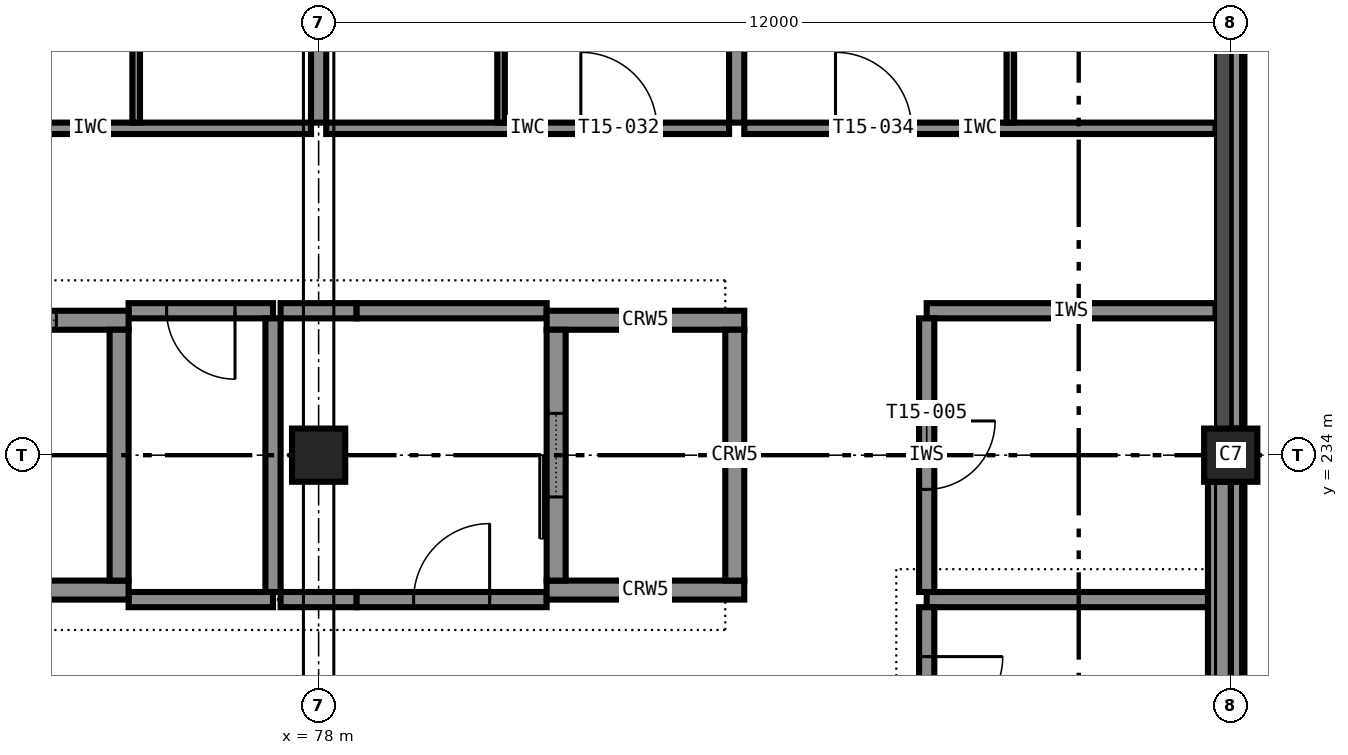
"""IFC4 building model, lengths in metres.
Left out: names, types, materials, properties, quantities, classifications, styles, units other than length and angle.
Written with IfcOpenShell. Run it as: python <this file> out.ifc"""

import sys

from ifc_helpers import new_model, si_unit, direction, frame, frame_2d, origin, origin_2d, place, context, subcontext, project, spatial, rectangle, extrude, element, fill, save


model = new_model("IFC4")
c1 = context("Model", 3, precision=1e-05, world=origin(), true_north=direction((0.0, 1.0)))
c2 = subcontext(c1, "Body", "Model", "MODEL_VIEW")
j1 = project(units=[si_unit("LENGTHUNIT", "METRE"), si_unit("PLANEANGLEUNIT", "RADIAN")], contexts=[c1])
p1 = place(None, origin())
s1 = spatial("IfcSite", under=j1, at=p1, CompositionType="ELEMENT")
p2 = place(p1, origin())
s2 = spatial("IfcBuilding", under=s1, at=p2, CompositionType="ELEMENT")
p3 = place(p2, frame((0.0, 0.0, 60.6)))
s3 = spatial("IfcBuildingStorey", under=s2, at=p3, CompositionType="ELEMENT", Elevation=60.6)
for number, where, z_axis, x_axis in (
    (1, (78.0, 234.0, 0.0), (0.0, 0.0, 1.0), (1.0, 0.0, 0.0)),
    (2, (90.0, 234.0, 0.0), (0.0, 0.0, 1.0), (1.0, 0.0, 0.0)),
):
    element("IfcColumn", number, at=place(p3, frame(where, z_axis=z_axis, x_axis=x_axis)), inside=s3, PredefinedType="COLUMN", context=c2, shape_type="SweptSolid", body=[
        extrude(rectangle(XDim=0.7, YDim=0.7, at=origin_2d()), origin(), (0.0, 0.0, 1.0), 3.6),
    ])
p4 = place(p3, frame((72.5, 232.225, 0.0), z_axis=(0.0, 0.0, 1.0), x_axis=(1.0, 0.0, 0.0)))
e3 = element("IfcWall", 3, at=p4, inside=s3, PredefinedType="SHEAR", context=c2, shape_type="SweptSolid", body=[
    extrude(rectangle(XDim=3.0, YDim=0.25, at=frame_2d((1.5, 0.0))), origin(), (0.0, 0.0, 1.0), 3.6),
])
p5 = place(p3, frame((72.5, 235.775, 0.0), z_axis=(0.0, 0.0, 1.0), x_axis=(1.0, 0.0, 0.0)))
e4 = element("IfcWall", 4, at=p5, inside=s3, PredefinedType="SHEAR", context=c2, shape_type="SweptSolid", body=[
    extrude(rectangle(XDim=3.0, YDim=0.25, at=frame_2d((1.5, 0.0))), origin(), (0.0, 0.0, 1.0), 3.6),
])
p6 = place(p5, frame((0.95, 0.0, 0.0)))
e5 = element("IfcOpeningElement", 5, at=p6, cuts=e4, PredefinedType="OPENING", context=c2, shape_type="SweptSolid", body=[
    extrude(rectangle(XDim=1.1, YDim=2.1, at=frame_2d((0.55, 1.05))), frame((0.0, 0.135, 0.0), z_axis=(0.0, -1.0, 0.0), x_axis=(1.0, 0.0, 0.0)), (0.0, 0.0, 1.0), 0.27),
])
p7 = place(p3, frame((75.375, 232.35, 0.0), z_axis=(0.0, 0.0, 1.0), x_axis=(0.0, 1.0, 0.0)))
e6 = element("IfcWall", 6, at=p7, inside=s3, PredefinedType="SHEAR", context=c2, shape_type="SweptSolid", body=[
    extrude(rectangle(XDim=3.3, YDim=0.25, at=frame_2d((1.65, 0.0))), origin(), (0.0, 0.0, 1.0), 3.6),
])
for number, where, z_axis, x_axis in (
    (7, (81.0, 232.225, 0.0), (0.0, 0.0, 1.0), (1.0, 0.0, 0.0)),
    (8, (81.0, 235.775, 0.0), (0.0, 0.0, 1.0), (1.0, 0.0, 0.0)),
):
    element("IfcWall", number, at=place(p3, frame(where, z_axis=z_axis, x_axis=x_axis)), inside=s3, PredefinedType="SHEAR", context=c2, shape_type="SweptSolid", body=[
        extrude(rectangle(XDim=2.6, YDim=0.25, at=frame_2d((1.3, 0.0))), origin(), (0.0, 0.0, 1.0), 3.6),
    ])
p8 = place(p3, frame((81.125, 232.35, 0.0), z_axis=(0.0, 0.0, 1.0), x_axis=(0.0, 1.0, 0.0)))
e9 = element("IfcWall", 9, at=p8, inside=s3, PredefinedType="SHEAR", context=c2, shape_type="SweptSolid", body=[
    extrude(rectangle(XDim=3.3, YDim=0.25, at=frame_2d((1.65, 0.0))), origin(), (0.0, 0.0, 1.0), 3.6),
])
p9 = place(p8, frame((1.1, 0.0, 0.0)))
e10 = element("IfcOpeningElement", 10, at=p9, cuts=e9, PredefinedType="OPENING", context=c2, shape_type="SweptSolid", body=[
    extrude(rectangle(XDim=1.1, YDim=2.1, at=frame_2d((0.55, 1.05))), frame((0.0, 0.135, 0.0), z_axis=(0.0, -1.0, 0.0), x_axis=(1.0, 0.0, 0.0)), (0.0, 0.0, 1.0), 0.27),
])
p10 = place(p3, frame((83.475, 232.35, 0.0), z_axis=(0.0, 0.0, 1.0), x_axis=(0.0, 1.0, 0.0)))
e11 = element("IfcWall", 11, at=p10, inside=s3, PredefinedType="SHEAR", context=c2, shape_type="SweptSolid", body=[
    extrude(rectangle(XDim=3.3, YDim=0.25, at=frame_2d((1.65, 0.0))), origin(), (0.0, 0.0, 1.0), 3.6),
])
p11 = place(p3, frame((89.85, 222.35, 0.0), z_axis=(0.0, 0.0, 1.0), x_axis=(0.0, 1.0, 0.0)))
e12 = element("IfcWall", 12, at=p11, inside=s3, PredefinedType="STANDARD", context=c2, shape_type="SweptSolid", body=[
    extrude(rectangle(XDim=11.3, YDim=0.3, at=frame_2d((5.65, 0.0))), origin(), (0.0, 0.0, 1.0), 2.6),
])
for number, where, z_axis, x_axis in (
    (13, (90.075, 222.35, 3.4), (0.0, 0.0, 1.0), (0.0, 1.0, 0.0)),
    (14, (90.075, 234.35, 3.4), (0.0, 0.0, 1.0), (0.0, 1.0, 0.0)),
):
    element("IfcWall", number, at=place(p3, frame(where, z_axis=z_axis, x_axis=x_axis)), inside=s3, PredefinedType="STANDARD", context=c2, shape_type="SweptSolid", body=[
        extrude(rectangle(XDim=11.3, YDim=0.15, at=frame_2d((5.65, 0.0))), origin(), (0.0, 0.0, 1.0), 0.2),
    ])
p12 = place(p3, frame((75.5, 232.1, 0.0), z_axis=(0.0, 0.0, 1.0), x_axis=(1.0, 0.0, 0.0)))
e15 = element("IfcWall", 15, at=p12, inside=s3, PredefinedType="PARTITIONING", context=c2, shape_type="SweptSolid", body=[
    extrude(rectangle(XDim=1.9, YDim=0.2, at=frame_2d((0.95, 0.0))), origin(), (0.0, 0.0, 1.0), 3.4),
])
p13 = place(p3, frame((77.5, 232.1, 0.0), z_axis=(0.0, 0.0, 1.0), x_axis=(1.0, 0.0, 0.0)))
e16 = element("IfcWall", 16, at=p13, inside=s3, PredefinedType="PARTITIONING", context=c2, shape_type="SweptSolid", body=[
    extrude(rectangle(XDim=1.0, YDim=0.2, at=frame_2d((0.5, 0.0))), origin(), (0.0, 0.0, 1.0), 3.4),
])
p14 = place(p3, frame((78.5, 232.1, 0.0), z_axis=(0.0, 0.0, 1.0), x_axis=(1.0, 0.0, 0.0)))
e17 = element("IfcWall", 17, at=p14, inside=s3, PredefinedType="PARTITIONING", context=c2, shape_type="SweptSolid", body=[
    extrude(rectangle(XDim=2.5, YDim=0.2, at=frame_2d((1.25, 0.0))), origin(), (0.0, 0.0, 1.0), 3.4),
])
p15 = place(p14, frame((0.75, 0.0, 0.0)))
e18 = element("IfcOpeningElement", 18, at=p15, cuts=e17, PredefinedType="OPENING", context=c2, shape_type="SweptSolid", body=[
    extrude(rectangle(XDim=1.0, YDim=2.1, at=frame_2d((0.5, 1.05))), frame((0.0, 0.11, 0.0), z_axis=(0.0, -1.0, 0.0), x_axis=(1.0, 0.0, 0.0)), (0.0, 0.0, 1.0), 0.22),
])
p16 = place(p3, frame((86.0, 232.1, 0.0), z_axis=(0.0, 0.0, 1.0), x_axis=(1.0, 0.0, 0.0)))
e19 = element("IfcWall", 19, at=p16, inside=s3, PredefinedType="PARTITIONING", context=c2, shape_type="SweptSolid", body=[
    extrude(rectangle(XDim=3.7, YDim=0.2, at=frame_2d((1.85, 0.0))), origin(), (0.0, 0.0, 1.0), 3.4),
])
p17 = place(p3, frame((77.4, 235.9, 0.0), z_axis=(0.0, 0.0, 1.0), x_axis=(-1.0, 0.0, 0.0)))
e20 = element("IfcWall", 20, at=p17, inside=s3, PredefinedType="PARTITIONING", context=c2, shape_type="SweptSolid", body=[
    extrude(rectangle(XDim=1.9, YDim=0.2, at=frame_2d((0.95, 0.0))), origin(), (0.0, 0.0, 1.0), 3.4),
])
p18 = place(p17, frame((0.5, 0.0, 0.0)))
e21 = element("IfcOpeningElement", 21, at=p18, cuts=e20, PredefinedType="OPENING", context=c2, shape_type="SweptSolid", body=[
    extrude(rectangle(XDim=0.9, YDim=2.1, at=frame_2d((0.45, 1.05))), frame((0.0, 0.11, 0.0), z_axis=(0.0, -1.0, 0.0), x_axis=(1.0, 0.0, 0.0)), (0.0, 0.0, 1.0), 0.22),
])
p19 = place(p3, frame((77.5, 235.9, 0.0), z_axis=(0.0, 0.0, 1.0), x_axis=(1.0, 0.0, 0.0)))
e22 = element("IfcWall", 22, at=p19, inside=s3, PredefinedType="PARTITIONING", context=c2, shape_type="SweptSolid", body=[
    extrude(rectangle(XDim=1.0, YDim=0.2, at=frame_2d((0.5, 0.0))), origin(), (0.0, 0.0, 1.0), 3.4),
])
p20 = place(p3, frame((78.5, 235.9, 0.0), z_axis=(0.0, 0.0, 1.0), x_axis=(1.0, 0.0, 0.0)))
e23 = element("IfcWall", 23, at=p20, inside=s3, PredefinedType="PARTITIONING", context=c2, shape_type="SweptSolid", body=[
    extrude(rectangle(XDim=2.5, YDim=0.2, at=frame_2d((1.25, 0.0))), origin(), (0.0, 0.0, 1.0), 3.4),
])
p21 = place(p3, frame((86.0, 235.9, 0.0), z_axis=(0.0, 0.0, 1.0), x_axis=(1.0, 0.0, 0.0)))
e24 = element("IfcWall", 24, at=p21, inside=s3, PredefinedType="PARTITIONING", context=c2, shape_type="SweptSolid", body=[
    extrude(rectangle(XDim=3.8, YDim=0.2, at=frame_2d((1.9, 0.0))), origin(), (0.0, 0.0, 1.0), 3.4),
])
p22 = place(p3, frame((77.4, 232.2, 0.0), z_axis=(0.0, 0.0, 1.0), x_axis=(0.0, 1.0, 0.0)))
e25 = element("IfcWall", 25, at=p22, inside=s3, PredefinedType="PARTITIONING", context=c2, shape_type="SweptSolid", body=[
    extrude(rectangle(XDim=3.6, YDim=0.2, at=frame_2d((1.8, 0.0))), origin(), (0.0, 0.0, 1.0), 3.4),
])
p23 = place(p3, frame((86.0, 235.8, 0.0), z_axis=(0.0, 0.0, 1.0), x_axis=(0.0, -1.0, 0.0)))
e26 = element("IfcWall", 26, at=p23, inside=s3, PredefinedType="PARTITIONING", context=c2, shape_type="SweptSolid", body=[
    extrude(rectangle(XDim=3.6, YDim=0.2, at=frame_2d((1.8, 0.0))), origin(), (0.0, 0.0, 1.0), 3.4),
])
p24 = place(p23, frame((1.35, 0.0, 0.0)))
e27 = element("IfcOpeningElement", 27, at=p24, cuts=e26, PredefinedType="OPENING", context=c2, shape_type="SweptSolid", body=[
    extrude(rectangle(XDim=0.9, YDim=2.1, at=frame_2d((0.45, 1.05))), frame((0.0, 0.11, 0.0), z_axis=(0.0, -1.0, 0.0), x_axis=(1.0, 0.0, 0.0)), (0.0, 0.0, 1.0), 0.22),
])
p25 = place(p3, frame((86.0, 232.0, 0.0), z_axis=(0.0, 0.0, 1.0), x_axis=(0.0, -1.0, 0.0)))
e28 = element("IfcWall", 28, at=p25, inside=s3, PredefinedType="PARTITIONING", context=c2, shape_type="SweptSolid", body=[
    extrude(rectangle(XDim=2.3, YDim=0.2, at=frame_2d((1.15, 0.0))), origin(), (0.0, 0.0, 1.0), 3.4),
])
p26 = place(p25, frame((0.65, 0.0, 0.0)))
e29 = element("IfcOpeningElement", 29, at=p26, cuts=e28, PredefinedType="OPENING", context=c2, shape_type="SweptSolid", body=[
    extrude(rectangle(XDim=1.0, YDim=2.1, at=frame_2d((0.5, 1.05))), frame((0.0, 0.11, 0.0), z_axis=(0.0, -1.0, 0.0), x_axis=(1.0, 0.0, 0.0)), (0.0, 0.0, 1.0), 0.22),
])
p27 = place(p3, frame((72.1, 238.3, 0.0), z_axis=(0.0, 0.0, 1.0), x_axis=(1.0, 0.0, 0.0)))
e30 = element("IfcWall", 30, at=p27, inside=s3, PredefinedType="PARTITIONING", context=c2, shape_type="SweptSolid", body=[
    extrude(rectangle(XDim=5.8, YDim=0.15, at=frame_2d((2.9, 0.0))), origin(), (0.0, 0.0, 1.0), 3.4),
])
p28 = place(p27, frame((1.2, 0.0, 0.0)))
e31 = element("IfcOpeningElement", 31, at=p28, cuts=e30, PredefinedType="OPENING", context=c2, shape_type="SweptSolid", body=[
    extrude(rectangle(XDim=1.0, YDim=2.1, at=frame_2d((0.5, 1.05))), frame((0.0, 0.085, 0.0), z_axis=(0.0, -1.0, 0.0), x_axis=(1.0, 0.0, 0.0)), (0.0, 0.0, 1.0), 0.17),
])
p29 = place(p3, frame((75.6, 238.375, 0.0), z_axis=(0.0, 0.0, 1.0), x_axis=(0.0, 1.0, 0.0)))
e32 = element("IfcWall", 32, at=p29, inside=s3, PredefinedType="PARTITIONING", context=c2, shape_type="SweptSolid", body=[
    extrude(rectangle(XDim=2.875, YDim=0.1, at=frame_2d((1.438, 0.0))), origin(), (0.0, 0.0, 1.0), 3.4),
])
p30 = place(p29, frame((1.038, 0.0, 0.0)))
e33 = element("IfcOpeningElement", 33, at=p30, cuts=e32, PredefinedType="OPENING", context=c2, shape_type="SweptSolid", body=[
    extrude(rectangle(XDim=0.8, YDim=2.1, at=frame_2d((0.4, 1.05))), frame((0.0, 0.06, 0.0), z_axis=(0.0, -1.0, 0.0), x_axis=(1.0, 0.0, 0.0)), (0.0, 0.0, 1.0), 0.12),
])
p31 = place(p3, frame((78.1, 238.3, 0.0), z_axis=(0.0, 0.0, 1.0), x_axis=(1.0, 0.0, 0.0)))
e34 = element("IfcWall", 34, at=p31, inside=s3, PredefinedType="PARTITIONING", context=c2, shape_type="SweptSolid", body=[
    extrude(rectangle(XDim=5.3, YDim=0.15, at=frame_2d((2.65, 0.0))), origin(), (0.0, 0.0, 1.0), 3.4),
])
p32 = place(p31, frame((3.35, 0.0, 0.0)))
e35 = element("IfcOpeningElement", 35, at=p32, cuts=e34, PredefinedType="OPENING", context=c2, shape_type="SweptSolid", body=[
    extrude(rectangle(XDim=1.0, YDim=2.1, at=frame_2d((0.5, 1.05))), frame((0.0, 0.085, 0.0), z_axis=(0.0, -1.0, 0.0), x_axis=(1.0, 0.0, 0.0)), (0.0, 0.0, 1.0), 0.17),
])
p33 = place(p3, frame((80.4, 241.25, 0.0), z_axis=(0.0, 0.0, 1.0), x_axis=(0.0, -1.0, 0.0)))
e36 = element("IfcWall", 36, at=p33, inside=s3, PredefinedType="PARTITIONING", context=c2, shape_type="SweptSolid", body=[
    extrude(rectangle(XDim=2.875, YDim=0.1, at=frame_2d((1.438, 0.0))), origin(), (0.0, 0.0, 1.0), 3.4),
])
p34 = place(p33, frame((1.038, 0.0, 0.0)))
e37 = element("IfcOpeningElement", 37, at=p34, cuts=e36, PredefinedType="OPENING", context=c2, shape_type="SweptSolid", body=[
    extrude(rectangle(XDim=0.8, YDim=2.1, at=frame_2d((0.4, 1.05))), frame((0.0, 0.06, 0.0), z_axis=(0.0, -1.0, 0.0), x_axis=(1.0, 0.0, 0.0)), (0.0, 0.0, 1.0), 0.12),
])
p35 = place(p3, frame((83.6, 238.3, 0.0), z_axis=(0.0, 0.0, 1.0), x_axis=(1.0, 0.0, 0.0)))
e38 = element("IfcWall", 38, at=p35, inside=s3, PredefinedType="PARTITIONING", context=c2, shape_type="SweptSolid", body=[
    extrude(rectangle(XDim=6.2, YDim=0.15, at=frame_2d((3.1, 0.0))), origin(), (0.0, 0.0, 1.0), 3.4),
])
p36 = place(p35, frame((1.2, 0.0, 0.0)))
e39 = element("IfcOpeningElement", 39, at=p36, cuts=e38, PredefinedType="OPENING", context=c2, shape_type="SweptSolid", body=[
    extrude(rectangle(XDim=1.0, YDim=2.1, at=frame_2d((0.5, 1.05))), frame((0.0, 0.085, 0.0), z_axis=(0.0, -1.0, 0.0), x_axis=(1.0, 0.0, 0.0)), (0.0, 0.0, 1.0), 0.17),
])
p37 = place(p3, frame((87.1, 238.375, 0.0), z_axis=(0.0, 0.0, 1.0), x_axis=(0.0, 1.0, 0.0)))
e40 = element("IfcWall", 40, at=p37, inside=s3, PredefinedType="PARTITIONING", context=c2, shape_type="SweptSolid", body=[
    extrude(rectangle(XDim=2.875, YDim=0.1, at=frame_2d((1.438, 0.0))), origin(), (0.0, 0.0, 1.0), 3.4),
])
p38 = place(p37, frame((1.038, 0.0, 0.0)))
e41 = element("IfcOpeningElement", 41, at=p38, cuts=e40, PredefinedType="OPENING", context=c2, shape_type="SweptSolid", body=[
    extrude(rectangle(XDim=0.8, YDim=2.1, at=frame_2d((0.4, 1.05))), frame((0.0, 0.06, 0.0), z_axis=(0.0, -1.0, 0.0), x_axis=(1.0, 0.0, 0.0)), (0.0, 0.0, 1.0), 0.12),
])
p39 = place(p3, frame((78.0, 245.65, 0.0), z_axis=(0.0, 0.0, 1.0), x_axis=(0.0, -1.0, 0.0)))
e42 = element("IfcWall", 42, at=p39, inside=s3, PredefinedType="PARTITIONING", context=c2, shape_type="SweptSolid", body=[
    extrude(rectangle(XDim=7.275, YDim=0.2, at=frame_2d((3.637, 0.0))), origin(), (0.0, 0.0, 1.0), 2.6),
])
p40 = place(p3, frame((83.5, 245.7, 0.0), z_axis=(0.0, 0.0, 1.0), x_axis=(0.0, -1.0, 0.0)))
e43 = element("IfcWall", 43, at=p40, inside=s3, PredefinedType="PARTITIONING", context=c2, shape_type="SweptSolid", body=[
    extrude(rectangle(XDim=7.325, YDim=0.2, at=frame_2d((3.663, 0.0))), origin(), (0.0, 0.0, 1.0), 3.4),
])
p41 = place(p18, origin())
e44 = element("IfcDoor", 44, at=p41, inside=s3, OperationType="SINGLE_SWING_LEFT", PredefinedType="DOOR", context=c2, shape_type="SweptSolid", body=[
    extrude(rectangle(XDim=0.9, YDim=2.1, at=frame_2d((0.45, 1.05))), frame((0.0, 0.025, 0.0), z_axis=(0.0, -1.0, 0.0), x_axis=(1.0, 0.0, 0.0)), (0.0, 0.0, 1.0), 0.05),
])
fill(e21, e44)
p42 = place(p15, origin())
e45 = element("IfcDoor", 45, at=p42, inside=s3, OperationType="SINGLE_SWING_RIGHT", PredefinedType="DOOR", context=c2, shape_type="SweptSolid", body=[
    extrude(rectangle(XDim=1.0, YDim=2.1, at=frame_2d((0.5, 1.05))), frame((0.0, 0.025, 0.0), z_axis=(0.0, -1.0, 0.0), x_axis=(1.0, 0.0, 0.0)), (0.0, 0.0, 1.0), 0.05),
])
fill(e18, e45)
p43 = place(p24, origin())
e46 = element("IfcDoor", 46, at=p43, inside=s3, OperationType="SINGLE_SWING_LEFT", PredefinedType="DOOR", context=c2, shape_type="SweptSolid", body=[
    extrude(rectangle(XDim=0.9, YDim=2.1, at=frame_2d((0.45, 1.05))), frame((0.0, 0.025, 0.0), z_axis=(0.0, -1.0, 0.0), x_axis=(1.0, 0.0, 0.0)), (0.0, 0.0, 1.0), 0.05),
])
fill(e27, e46)
p44 = place(p26, origin())
e47 = element("IfcDoor", 47, at=p44, inside=s3, OperationType="SINGLE_SWING_LEFT", PredefinedType="DOOR", context=c2, shape_type="SweptSolid", body=[
    extrude(rectangle(XDim=1.0, YDim=2.1, at=frame_2d((0.5, 1.05))), frame((0.0, 0.025, 0.0), z_axis=(0.0, -1.0, 0.0), x_axis=(1.0, 0.0, 0.0)), (0.0, 0.0, 1.0), 0.05),
])
fill(e29, e47)
p45 = place(p32, origin())
e48 = element("IfcDoor", 48, at=p45, inside=s3, OperationType="SINGLE_SWING_LEFT", PredefinedType="DOOR", context=c2, shape_type="SweptSolid", body=[
    extrude(rectangle(XDim=1.0, YDim=2.1, at=frame_2d((0.5, 1.05))), frame((0.0, 0.025, 0.0), z_axis=(0.0, -1.0, 0.0), x_axis=(1.0, 0.0, 0.0)), (0.0, 0.0, 1.0), 0.05),
])
fill(e35, e48)
p46 = place(p36, origin())
e49 = element("IfcDoor", 49, at=p46, inside=s3, OperationType="SINGLE_SWING_LEFT", PredefinedType="DOOR", context=c2, shape_type="SweptSolid", body=[
    extrude(rectangle(XDim=1.0, YDim=2.1, at=frame_2d((0.5, 1.05))), frame((0.0, 0.025, 0.0), z_axis=(0.0, -1.0, 0.0), x_axis=(1.0, 0.0, 0.0)), (0.0, 0.0, 1.0), 0.05),
])
fill(e39, e49)
p47 = place(p6, origin())
e50 = element("IfcDoor", 50, at=p47, inside=s3, OperationType="SLIDING_TO_LEFT", PredefinedType="DOOR", context=c2, shape_type="SweptSolid", body=[
    extrude(rectangle(XDim=1.1, YDim=2.1, at=frame_2d((0.55, 1.05))), frame((0.0, 0.025, 0.0), z_axis=(0.0, -1.0, 0.0), x_axis=(1.0, 0.0, 0.0)), (0.0, 0.0, 1.0), 0.05),
])
fill(e5, e50)
p48 = place(p9, origin())
e51 = element("IfcDoor", 51, at=p48, inside=s3, OperationType="SLIDING_TO_LEFT", PredefinedType="DOOR", context=c2, shape_type="SweptSolid", body=[
    extrude(rectangle(XDim=1.1, YDim=2.1, at=frame_2d((0.55, 1.05))), frame((0.0, 0.025, 0.0), z_axis=(0.0, -1.0, 0.0), x_axis=(1.0, 0.0, 0.0)), (0.0, 0.0, 1.0), 0.05),
])
fill(e10, e51)
save(model, sys.argv[1])
